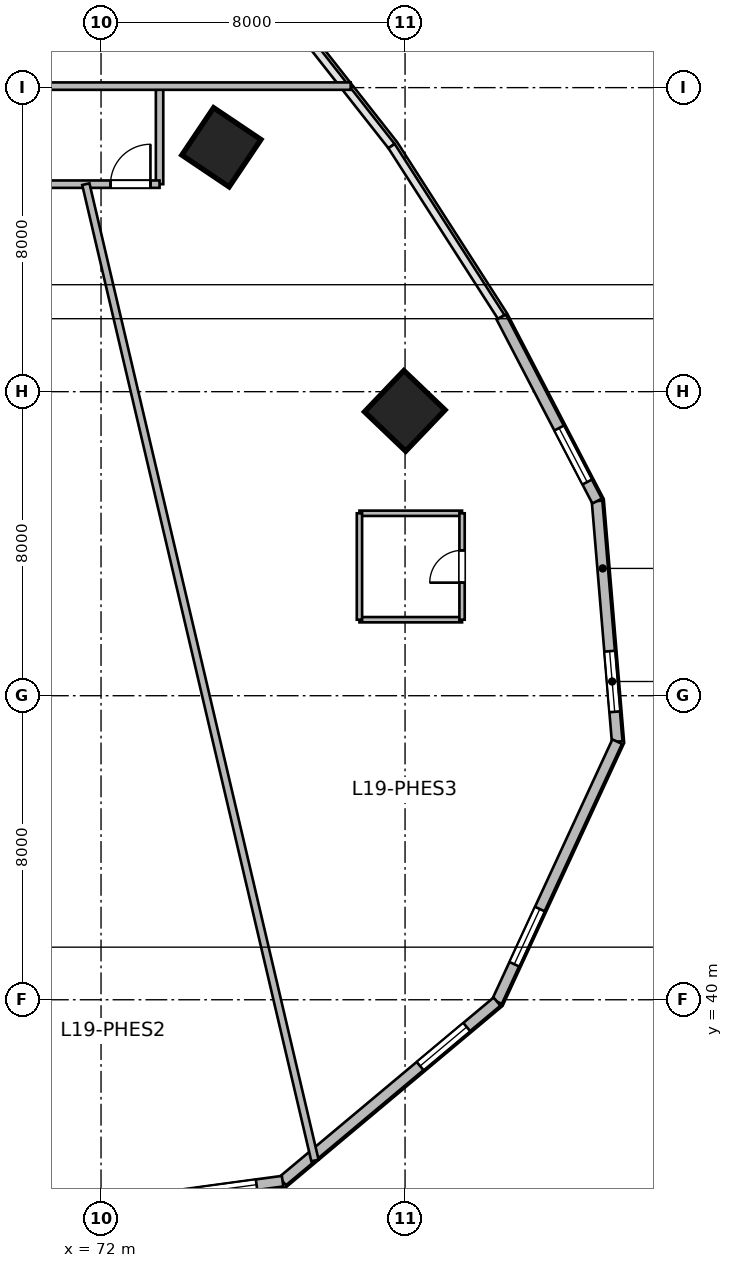
"""IFC4 building model, lengths in metres.
Left out: names, types, materials, properties, quantities, classifications, styles, units other than length and angle.
Written with IfcOpenShell. Run it as: python <this file> out.ifc"""

import sys

from ifc_helpers import new_model, si_unit, direction, frame, frame_2d, origin, origin_2d, place, context, subcontext, project, spatial, rectangle, extrude, source, transform, mapped, element, fill, save


model = new_model("IFC4")
c1 = context("Model", 3, precision=1e-05, world=origin(), true_north=direction((0.0, 1.0)))
c2 = subcontext(c1, "Body", "Model", "MODEL_VIEW")
j1 = project(units=[si_unit("LENGTHUNIT", "METRE"), si_unit("PLANEANGLEUNIT", "RADIAN")], contexts=[c1])
p1 = place(None, origin())
s1 = spatial("IfcSite", under=j1, at=p1, CompositionType="ELEMENT")
p2 = place(p1, origin())
s2 = spatial("IfcBuilding", under=s1, at=p2, CompositionType="ELEMENT")
p3 = place(p2, frame((0.0, 0.0, 82.2)))
s3 = spatial("IfcBuildingStorey", under=s2, at=p3, CompositionType="ELEMENT", Elevation=82.2)
m1 = source(origin(), c2, "Body", "SweptSolid", [
    extrude(rectangle(XDim=1.5, YDim=1.5, at=origin_2d()), origin(), (0.0, 0.0, 1.0), 3.6),
])
for number, where, z_axis, x_axis in (
    (1, (75.167, 62.43, 0.0), (0.0, 0.0, 1.0), (0.558, 0.83, 0.0)),
    (2, (79.993, 55.494, 0.0), (0.0, 0.0, 1.0), (0.691, 0.723, 0.0)),
):
    element("IfcColumn", number, at=place(p3, frame(where, z_axis=z_axis, x_axis=x_axis)), inside=s3, PredefinedType="COLUMN", context=c2, shape_type="MappedRepresentation", body=[
        mapped(m1, transform((0.0, 0.0, 0.0), scale=1.0)),
    ])
m2 = source(origin(), c2, "Body", "SweptSolid", [
    extrude(rectangle(XDim=6.353, YDim=0.28, at=frame_2d((3.176, 0.0))), origin(), (0.0, 0.0, 1.0), 3.28),
])
p4 = place(p3, frame((85.053, 53.122, 0.0), z_axis=(0.0, 0.0, 1.0), x_axis=(0.083319001377, -0.996522926986, 0.0)))
e3 = element("IfcWall", 3, at=p4, inside=s3, PredefinedType="SOLIDWALL", context=c2, shape_type="MappedRepresentation", body=[
    mapped(m2, transform((0.0, 0.0, 0.0), scale=1.0)),
])
p5 = place(p4, frame((3.964, 0.0, 0.95)))
e4 = element("IfcOpeningElement", 4, at=p5, cuts=e3, PredefinedType="OPENING", context=c2, shape_type="SweptSolid", body=[
    extrude(rectangle(XDim=1.6, YDim=1.9, at=frame_2d((0.8, 0.95))), frame((0.0, 0.15, 0.0), z_axis=(0.0, -1.0, 0.0), x_axis=(1.0, 0.0, 0.0)), (0.0, 0.0, 1.0), 0.3),
])
m3 = source(origin(), c2, "Body", "SweptSolid", [
    extrude(rectangle(XDim=7.536, YDim=0.28, at=frame_2d((3.768, 0.0))), origin(), (0.0, 0.0, 1.0), 3.28),
])
p6 = place(p3, frame((85.582, 46.792, 0.0), z_axis=(0.0, 0.0, 1.0), x_axis=(-0.41964973873, -0.907686122393, 0.0)))
e5 = element("IfcWall", 5, at=p6, inside=s3, PredefinedType="SOLIDWALL", context=c2, shape_type="MappedRepresentation", body=[
    mapped(m3, transform((0.0, 0.0, 0.0), scale=1.0)),
])
p7 = place(p6, frame((4.852, 0.0, 0.95)))
e6 = element("IfcOpeningElement", 6, at=p7, cuts=e5, PredefinedType="OPENING", context=c2, shape_type="SweptSolid", body=[
    extrude(rectangle(XDim=1.6, YDim=1.9, at=frame_2d((0.8, 0.95))), frame((0.0, 0.15, 0.0), z_axis=(0.0, -1.0, 0.0), x_axis=(1.0, 0.0, 0.0)), (0.0, 0.0, 1.0), 0.3),
])
m4 = source(origin(), c2, "Body", "SweptSolid", [
    extrude(rectangle(XDim=7.359, YDim=0.28, at=frame_2d((3.679, 0.0))), origin(), (0.0, 0.0, 1.0), 3.28),
])
p8 = place(p3, frame((82.42, 39.951, 0.0), z_axis=(0.0, 0.0, 1.0), x_axis=(-0.766737165543, -0.641961150675, 0.0)))
e7 = element("IfcWall", 7, at=p8, inside=s3, PredefinedType="SOLIDWALL", context=c2, shape_type="MappedRepresentation", body=[
    mapped(m4, transform((0.0, 0.0, 0.0), scale=1.0)),
])
p9 = place(p8, frame((1.04, 0.0, 0.95)))
e8 = element("IfcOpeningElement", 8, at=p9, cuts=e7, PredefinedType="OPENING", context=c2, shape_type="SweptSolid", body=[
    extrude(rectangle(XDim=1.6, YDim=1.9, at=frame_2d((0.8, 0.95))), frame((0.0, 0.15, 0.0), z_axis=(0.0, -1.0, 0.0), x_axis=(1.0, 0.0, 0.0)), (0.0, 0.0, 1.0), 0.3),
])
m5 = source(origin(), c2, "Body", "SweptSolid", [
    extrude(rectangle(XDim=5.967, YDim=0.28, at=frame_2d((2.984, 0.0))), origin(), (0.0, 0.0, 1.0), 3.28),
])
p10 = place(p3, frame((76.777, 35.227, 0.0), z_axis=(0.0, 0.0, 1.0), x_axis=(-0.990927009341, -0.134401124099, 0.0)))
e9 = element("IfcWall", 9, at=p10, inside=s3, PredefinedType="SOLIDWALL", context=c2, shape_type="MappedRepresentation", body=[
    mapped(m5, transform((0.0, 0.0, 0.0), scale=1.0)),
])
p11 = place(p10, frame((0.692, 0.0, 0.95)))
e10 = element("IfcOpeningElement", 10, at=p11, cuts=e9, PredefinedType="OPENING", context=c2, shape_type="SweptSolid", body=[
    extrude(rectangle(XDim=1.6, YDim=1.9, at=frame_2d((0.8, 0.95))), frame((0.0, 0.15, 0.0), z_axis=(0.0, -1.0, 0.0), x_axis=(1.0, 0.0, 0.0)), (0.0, 0.0, 1.0), 0.3),
])
m6 = source(origin(), c2, "Body", "SweptSolid", [
    extrude(rectangle(XDim=5.222, YDim=0.28, at=frame_2d((2.611, 0.0))), origin(), (0.0, 0.0, 1.0), 3.28),
])
p12 = place(p3, frame((70.864, 34.425, 0.0), z_axis=(0.0, 0.0, 1.0), x_axis=(-0.761900099546, 0.647694556339, 0.0)))
e11 = element("IfcWall", 11, at=p12, inside=s3, PredefinedType="SOLIDWALL", context=c2, shape_type="MappedRepresentation", body=[
    mapped(m6, transform((0.0, 0.0, 0.0), scale=1.0)),
])
p13 = place(p12, frame((0.506, 0.0, 0.95)))
e12 = element("IfcOpeningElement", 12, at=p13, cuts=e11, PredefinedType="OPENING", context=c2, shape_type="SweptSolid", body=[
    extrude(rectangle(XDim=1.6, YDim=1.9, at=frame_2d((0.8, 0.95))), frame((0.0, 0.15, 0.0), z_axis=(0.0, -1.0, 0.0), x_axis=(1.0, 0.0, 0.0)), (0.0, 0.0, 1.0), 0.3),
])
m7 = source(origin(), c2, "Body", "SweptSolid", [
    extrude(rectangle(XDim=5.459, YDim=0.28, at=frame_2d((2.73, 0.0))), origin(), (0.0, 0.0, 1.0), 3.28),
])
p14 = place(p3, frame((82.532, 57.965, 0.0), z_axis=(0.0, 0.0, 1.0), x_axis=(0.461768054321, -0.887000712518, 0.0)))
e13 = element("IfcWall", 13, at=p14, inside=s3, PredefinedType="SOLIDWALL", context=c2, shape_type="MappedRepresentation", body=[
    mapped(m7, transform((0.0, 0.0, 0.0), scale=1.0)),
])
p15 = place(p14, frame((3.295, 0.0, 0.95)))
e14 = element("IfcOpeningElement", 14, at=p15, cuts=e13, PredefinedType="OPENING", context=c2, shape_type="SweptSolid", body=[
    extrude(rectangle(XDim=1.6, YDim=1.9, at=frame_2d((0.8, 0.95))), frame((0.0, 0.15, 0.0), z_axis=(0.0, -1.0, 0.0), x_axis=(1.0, 0.0, 0.0)), (0.0, 0.0, 1.0), 0.3),
])
m8 = source(origin(), c2, "Body", "SweptSolid", [
    extrude(rectangle(XDim=2.58, YDim=0.195, at=frame_2d((1.29, 0.0))), origin(), (0.0, 0.0, 1.0), 2.847),
])
p16 = place(p3, frame((73.54, 61.46, 0.0), z_axis=(0.0, 0.0, 1.0), x_axis=(0.0, 1.0, 0.0)))
e15 = element("IfcWall", 15, at=p16, inside=s3, PredefinedType="PARTITIONING", context=c2, shape_type="MappedRepresentation", body=[
    mapped(m8, transform((0.0, 0.0, 0.0), scale=1.0)),
])
m9 = source(origin(), c2, "Body", "SweptSolid", [
    extrude(rectangle(XDim=16.93, YDim=0.195, at=frame_2d((8.465, 0.0))), origin(), (0.0, 0.0, 1.0), 3.28),
])
p17 = place(p3, frame((61.64, 64.04, 0.0), z_axis=(0.0, 0.0, 1.0), x_axis=(1.0, 0.0, 0.0)))
e16 = element("IfcWall", 16, at=p17, inside=s3, PredefinedType="PARTITIONING", context=c2, shape_type="MappedRepresentation", body=[
    mapped(m9, transform((0.0, 0.0, 0.0), scale=1.0)),
])
p18 = place(p17, frame((7.94, 0.0, 0.0)))
e17 = element("IfcOpeningElement", 17, at=p18, cuts=e16, PredefinedType="OPENING", context=c2, shape_type="SweptSolid", body=[
    extrude(rectangle(XDim=1.05, YDim=2.15, at=frame_2d((0.525, 1.075))), frame((0.0, 0.107, 0.0), z_axis=(0.0, -1.0, 0.0), x_axis=(1.0, 0.0, 0.0)), (0.0, 0.0, 1.0), 0.215),
])
m10 = source(origin(), c2, "Body", "SweptSolid", [
    extrude(rectangle(XDim=11.9, YDim=0.195, at=frame_2d((5.95, 0.0))), origin(), (0.0, 0.0, 1.0), 3.28),
])
p19 = place(p3, frame((61.64, 61.46, 0.0), z_axis=(0.0, 0.0, 1.0), x_axis=(1.0, 0.0, 0.0)))
e18 = element("IfcWall", 18, at=p19, inside=s3, PredefinedType="PARTITIONING", context=c2, shape_type="MappedRepresentation", body=[
    mapped(m10, transform((0.0, 0.0, 0.0), scale=1.0)),
])
p20 = place(p19, frame((3.61, 0.0, 0.0)))
e19 = element("IfcOpeningElement", 19, at=p20, cuts=e18, PredefinedType="OPENING", context=c2, shape_type="SweptSolid", body=[
    extrude(rectangle(XDim=1.05, YDim=2.15, at=frame_2d((0.525, 1.075))), frame((0.0, 0.107, 0.0), z_axis=(0.0, -1.0, 0.0), x_axis=(1.0, 0.0, 0.0)), (0.0, 0.0, 1.0), 0.215),
])
p21 = place(p19, frame((5.425, 0.0, 0.0)))
e20 = element("IfcOpeningElement", 20, at=p21, cuts=e18, PredefinedType="OPENING", context=c2, shape_type="SweptSolid", body=[
    extrude(rectangle(XDim=1.05, YDim=2.15, at=frame_2d((0.525, 1.075))), frame((0.0, 0.107, 0.0), z_axis=(0.0, -1.0, 0.0), x_axis=(1.0, 0.0, 0.0)), (0.0, 0.0, 1.0), 0.215),
])
p22 = place(p19, frame((10.61, 0.0, 0.0)))
e21 = element("IfcOpeningElement", 21, at=p22, cuts=e18, PredefinedType="OPENING", context=c2, shape_type="SweptSolid", body=[
    extrude(rectangle(XDim=1.05, YDim=2.15, at=frame_2d((0.525, 1.075))), frame((0.0, 0.107, 0.0), z_axis=(0.0, -1.0, 0.0), x_axis=(1.0, 0.0, 0.0)), (0.0, 0.0, 1.0), 0.215),
])
m11 = source(origin(), c2, "Body", "SweptSolid", [
    extrude(rectangle(XDim=26.387, YDim=0.195, at=frame_2d((13.194, 0.0))), origin(), (0.0, 0.0, 1.0), 2.847),
])
p23 = place(p3, frame((77.629, 35.771, 0.0), z_axis=(0.0, 0.0, 1.0), x_axis=(-0.228490600532, 0.97354611882, 0.0)))
e22 = element("IfcWall", 22, at=p23, inside=s3, PredefinedType="PARTITIONING", context=c2, shape_type="MappedRepresentation", body=[
    mapped(m11, transform((0.0, 0.0, 0.0), scale=1.0)),
])
m12 = source(origin(), c2, "Body", "SweptSolid", [
    extrude(rectangle(XDim=2.7, YDim=0.14, at=frame_2d((1.35, 0.0))), origin(), (0.0, 0.0, 1.0), 3.28),
])
for number, where, z_axis, x_axis in (
    (23, (78.8, 52.8, 0.0), (0.0, 0.0, 1.0), (1.0, 0.0, 0.0)),
    (24, (78.8, 50.0, 0.0), (0.0, 0.0, 1.0), (1.0, 0.0, 0.0)),
):
    element("IfcWall", number, at=place(p3, frame(where, z_axis=z_axis, x_axis=x_axis)), inside=s3, PredefinedType="PARTITIONING", context=c2, shape_type="MappedRepresentation", body=[
        mapped(m12, transform((0.0, 0.0, 0.0), scale=1.0)),
    ])
m13 = source(origin(), c2, "Body", "SweptSolid", [
    extrude(rectangle(XDim=2.8, YDim=0.14, at=frame_2d((1.4, 0.0))), origin(), (0.0, 0.0, 1.0), 3.28),
])
p24 = place(p3, frame((78.8, 50.0, 0.0), z_axis=(0.0, 0.0, 1.0), x_axis=(0.0, 1.0, 0.0)))
e25 = element("IfcWall", 25, at=p24, inside=s3, PredefinedType="PARTITIONING", context=c2, shape_type="MappedRepresentation", body=[
    mapped(m13, transform((0.0, 0.0, 0.0), scale=1.0)),
])
p25 = place(p3, frame((81.5, 50.0, 0.0), z_axis=(0.0, 0.0, 1.0), x_axis=(0.0, 1.0, 0.0)))
e26 = element("IfcWall", 26, at=p25, inside=s3, PredefinedType="PARTITIONING", context=c2, shape_type="MappedRepresentation", body=[
    mapped(m13, transform((0.0, 0.0, 0.0), scale=1.0)),
])
p26 = place(p25, frame((0.975, 0.0, 0.0)))
e27 = element("IfcOpeningElement", 27, at=p26, cuts=e26, PredefinedType="OPENING", context=c2, shape_type="SweptSolid", body=[
    extrude(rectangle(XDim=0.85, YDim=2.05, at=frame_2d((0.425, 1.025))), frame((0.0, 0.08, 0.0), z_axis=(0.0, -1.0, 0.0), x_axis=(1.0, 0.0, 0.0)), (0.0, 0.0, 1.0), 0.16),
])
m14 = source(origin(), c2, "Body", "SweptSolid", [
    extrude(rectangle(XDim=1.6, YDim=1.9, at=frame_2d((0.8, 0.95))), frame((0.0, 0.03, 0.0), z_axis=(0.0, -1.0, 0.0), x_axis=(1.0, 0.0, 0.0)), (0.0, 0.0, 1.0), 0.06),
])
p27 = place(p5, origin())
e28 = element("IfcWindow", 28, at=p27, inside=s3, PartitioningType="SINGLE_PANEL", PredefinedType="WINDOW", context=c2, shape_type="MappedRepresentation", body=[
    mapped(m14, transform((0.0, 0.0, 0.0), scale=1.0)),
])
fill(e4, e28)
p28 = place(p7, origin())
e29 = element("IfcWindow", 29, at=p28, inside=s3, PartitioningType="SINGLE_PANEL", PredefinedType="WINDOW", context=c2, shape_type="MappedRepresentation", body=[
    mapped(m14, transform((0.0, 0.0, 0.0), scale=1.0)),
])
fill(e6, e29)
p29 = place(p9, origin())
e30 = element("IfcWindow", 30, at=p29, inside=s3, PartitioningType="SINGLE_PANEL", PredefinedType="WINDOW", context=c2, shape_type="MappedRepresentation", body=[
    mapped(m14, transform((0.0, 0.0, 0.0), scale=1.0)),
])
fill(e8, e30)
p30 = place(p11, origin())
e31 = element("IfcWindow", 31, at=p30, inside=s3, PartitioningType="SINGLE_PANEL", PredefinedType="WINDOW", context=c2, shape_type="MappedRepresentation", body=[
    mapped(m14, transform((0.0, 0.0, 0.0), scale=1.0)),
])
fill(e10, e31)
p31 = place(p15, origin())
e32 = element("IfcWindow", 32, at=p31, inside=s3, PartitioningType="SINGLE_PANEL", PredefinedType="WINDOW", context=c2, shape_type="MappedRepresentation", body=[
    mapped(m14, transform((0.0, 0.0, 0.0), scale=1.0)),
])
fill(e14, e32)
m15 = source(origin(), c2, "Body", "SweptSolid", [
    extrude(rectangle(XDim=1.05, YDim=2.15, at=frame_2d((0.525, 1.075))), frame((0.0, 0.025, 0.0), z_axis=(0.0, -1.0, 0.0), x_axis=(1.0, 0.0, 0.0)), (0.0, 0.0, 1.0), 0.05),
])
p32 = place(p22, origin())
e33 = element("IfcDoor", 33, at=p32, inside=s3, OperationType="SINGLE_SWING_RIGHT", PredefinedType="DOOR", context=c2, shape_type="MappedRepresentation", body=[
    mapped(m15, transform((0.0, 0.0, 0.0), scale=1.0)),
])
fill(e21, e33)
m16 = source(origin(), c2, "Body", "SweptSolid", [
    extrude(rectangle(XDim=0.85, YDim=2.05, at=frame_2d((0.425, 1.025))), frame((0.0, 0.025, 0.0), z_axis=(0.0, -1.0, 0.0), x_axis=(1.0, 0.0, 0.0)), (0.0, 0.0, 1.0), 0.05),
])
p33 = place(p26, origin())
e34 = element("IfcDoor", 34, at=p33, inside=s3, OperationType="SINGLE_SWING_LEFT", PredefinedType="DOOR", context=c2, shape_type="MappedRepresentation", body=[
    mapped(m16, transform((0.0, 0.0, 0.0), scale=1.0)),
])
fill(e27, e34)
save(model, sys.argv[1])
